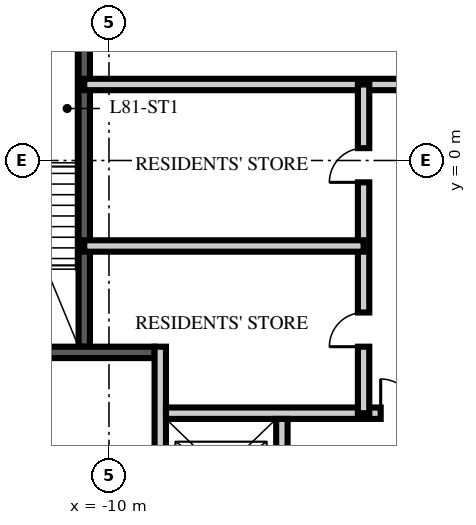
"""IFC4 building model, lengths in metres.
Left out: names, types, materials, properties, quantities, classifications, styles, units other than length and angle.
Written with IfcOpenShell. Run it as: python <this file> out.ifc"""

import sys

from ifc_helpers import new_model, si_unit, direction, frame, frame_2d, origin, place, context, subcontext, project, spatial, rectangle, extrude, element, fill, save


model = new_model("IFC4")
c1 = context("Model", 3, precision=1e-05, world=origin(), true_north=direction((0.0, 1.0)))
c2 = subcontext(c1, "Body", "Model", "MODEL_VIEW")
j1 = project(units=[si_unit("LENGTHUNIT", "METRE"), si_unit("PLANEANGLEUNIT", "RADIAN")], contexts=[c1])
p1 = place(None, origin())
s1 = spatial("IfcSite", under=j1, at=p1, CompositionType="ELEMENT")
p2 = place(p1, origin())
s2 = spatial("IfcBuilding", under=s1, at=p2, CompositionType="ELEMENT")
p3 = place(p2, frame((0.0, 0.0, 323.25)))
s3 = spatial("IfcBuildingStorey", under=s2, at=p3, CompositionType="ELEMENT", Elevation=323.25)
p4 = place(p3, frame((-10.65, -4.9, 0.0), z_axis=(0.0, 0.0, 1.0), x_axis=(0.0, 1.0, 0.0)))
e1 = element("IfcWall", 1, at=p4, inside=s3, PredefinedType="SOLIDWALL", context=c2, shape_type="SweptSolid", body=[
    extrude(rectangle(XDim=10.1, YDim=0.3, at=frame_2d((5.05, 0.0))), origin(), (0.0, 0.0, 1.0), 3.5),
])
p5 = place(p3, frame((-14.85, -5.05, 0.0), z_axis=(0.0, 0.0, 1.0), x_axis=(1.0, 0.0, 0.0)))
e2 = element("IfcWall", 2, at=p5, inside=s3, PredefinedType="SOLIDWALL", context=c2, shape_type="SweptSolid", body=[
    extrude(rectangle(XDim=6.05, YDim=0.3, at=frame_2d((3.025, 0.0))), origin(), (0.0, 0.0, 1.0), 3.5),
])
p6 = place(p5, frame((1.425, 0.0, 0.0)))
e3 = element("IfcOpeningElement", 3, at=p6, cuts=e2, PredefinedType="OPENING", context=c2, shape_type="SweptSolid", body=[
    extrude(rectangle(XDim=1.2, YDim=2.1, at=frame_2d((0.6, 1.05))), frame((0.0, 0.16, 0.0), z_axis=(0.0, -1.0, 0.0), x_axis=(1.0, 0.0, 0.0)), (0.0, 0.0, 1.0), 0.32),
])
p7 = place(p3, frame((-8.65, -11.35, 0.0), z_axis=(0.0, 0.0, 1.0), x_axis=(0.0, 1.0, 0.0)))
e4 = element("IfcWall", 4, at=p7, inside=s3, PredefinedType="PARTITIONING", context=c2, shape_type="SweptSolid", body=[
    extrude(rectangle(XDim=6.45, YDim=0.3, at=frame_2d((3.225, 0.0))), origin(), (0.0, 0.0, 1.0), 3.5),
])
p8 = place(p7, frame((2.6, 0.0, 0.0)))
e5 = element("IfcOpeningElement", 5, at=p8, cuts=e4, PredefinedType="OPENING", context=c2, shape_type="SweptSolid", body=[
    extrude(rectangle(XDim=1.1, YDim=2.1, at=frame_2d((0.55, 1.05))), frame((0.0, 0.16, 0.0), z_axis=(0.0, -1.0, 0.0), x_axis=(1.0, 0.0, 0.0)), (0.0, 0.0, 1.0), 0.32),
])
p9 = place(p3, frame((-8.5, -6.65, 0.0), z_axis=(0.0, 0.0, 1.0), x_axis=(1.0, 0.0, 0.0)))
e6 = element("IfcWall", 6, at=p9, inside=s3, PredefinedType="PARTITIONING", context=c2, shape_type="SweptSolid", body=[
    extrude(rectangle(XDim=17.0, YDim=0.3, at=frame_2d((8.5, 0.0))), origin(), (0.0, 0.0, 1.0), 3.5),
])
p10 = place(p9, frame((7.8, 0.0, 0.0)))
e7 = element("IfcOpeningElement", 7, at=p10, cuts=e6, PredefinedType="OPENING", context=c2, shape_type="SweptSolid", body=[
    extrude(rectangle(XDim=1.3, YDim=2.4, at=frame_2d((0.65, 1.2))), frame((0.0, 0.16, 0.0), z_axis=(0.0, -1.0, 0.0), x_axis=(1.0, 0.0, 0.0)), (0.0, 0.0, 1.0), 0.32),
])
p11 = place(p9, frame((5.65, 0.0, 0.0)))
e8 = element("IfcOpeningElement", 8, at=p11, cuts=e6, PredefinedType="OPENING", context=c2, shape_type="SweptSolid", body=[
    extrude(rectangle(XDim=0.9, YDim=2.1, at=frame_2d((0.45, 1.05))), frame((0.0, 0.16, 0.0), z_axis=(0.0, -1.0, 0.0), x_axis=(1.0, 0.0, 0.0)), (0.0, 0.0, 1.0), 0.32),
])
p12 = place(p9, frame((10.4, 0.0, 0.0)))
e9 = element("IfcOpeningElement", 9, at=p12, cuts=e6, PredefinedType="OPENING", context=c2, shape_type="SweptSolid", body=[
    extrude(rectangle(XDim=0.9, YDim=2.1, at=frame_2d((0.45, 1.05))), frame((0.0, 0.16, 0.0), z_axis=(0.0, -1.0, 0.0), x_axis=(1.0, 0.0, 0.0)), (0.0, 0.0, 1.0), 0.32),
])
p13 = place(p3, frame((-5.45, -11.35, 0.0), z_axis=(0.0, 0.0, 1.0), x_axis=(0.0, 1.0, 0.0)))
e10 = element("IfcWall", 10, at=p13, inside=s3, PredefinedType="PARTITIONING", context=c2, shape_type="SweptSolid", body=[
    extrude(rectangle(XDim=4.55, YDim=0.3, at=frame_2d((2.275, 0.0))), origin(), (0.0, 0.0, 1.0), 3.5),
])
p14 = place(p3, frame((-10.65, 2.0, 0.0), z_axis=(0.0, 0.0, 1.0), x_axis=(1.0, 0.0, 0.0)))
e11 = element("IfcWall", 11, at=p14, inside=s3, PredefinedType="PARTITIONING", context=c2, shape_type="SweptSolid", body=[
    extrude(rectangle(XDim=21.3, YDim=0.3, at=frame_2d((10.65, 0.0))), origin(), (0.0, 0.0, 1.0), 3.5),
])
p15 = place(p14, frame((10.05, 0.0, 0.0)))
e12 = element("IfcOpeningElement", 12, at=p15, cuts=e11, PredefinedType="OPENING", context=c2, shape_type="SweptSolid", body=[
    extrude(rectangle(XDim=1.2, YDim=2.1, at=frame_2d((0.6, 1.05))), frame((0.0, 0.16, 0.0), z_axis=(0.0, -1.0, 0.0), x_axis=(1.0, 0.0, 0.0)), (0.0, 0.0, 1.0), 0.32),
])
p16 = place(p14, frame((18.942, 0.0, 0.0)))
e13 = element("IfcOpeningElement", 13, at=p16, cuts=e11, PredefinedType="OPENING", context=c2, shape_type="SweptSolid", body=[
    extrude(rectangle(XDim=0.9, YDim=2.1, at=frame_2d((0.45, 1.05))), frame((0.0, 0.16, 0.0), z_axis=(0.0, -1.0, 0.0), x_axis=(1.0, 0.0, 0.0)), (0.0, 0.0, 1.0), 0.32),
])
p17 = place(p3, frame((-3.3, -6.65, 0.0), z_axis=(0.0, 0.0, 1.0), x_axis=(0.0, 1.0, 0.0)))
e14 = element("IfcWall", 14, at=p17, inside=s3, PredefinedType="PARTITIONING", context=c2, shape_type="SweptSolid", body=[
    extrude(rectangle(XDim=8.65, YDim=0.3, at=frame_2d((4.325, 0.0))), origin(), (0.0, 0.0, 1.0), 3.5),
])
p18 = place(p17, frame((1.75, 0.0, 0.0)))
e15 = element("IfcOpeningElement", 15, at=p18, cuts=e14, PredefinedType="OPENING", context=c2, shape_type="SweptSolid", body=[
    extrude(rectangle(XDim=0.9, YDim=2.1, at=frame_2d((0.45, 1.05))), frame((0.0, 0.16, 0.0), z_axis=(0.0, -1.0, 0.0), x_axis=(1.0, 0.0, 0.0)), (0.0, 0.0, 1.0), 0.32),
])
p19 = place(p17, frame((6.075, 0.0, 0.0)))
e16 = element("IfcOpeningElement", 16, at=p19, cuts=e14, PredefinedType="OPENING", context=c2, shape_type="SweptSolid", body=[
    extrude(rectangle(XDim=0.9, YDim=2.1, at=frame_2d((0.45, 1.05))), frame((0.0, 0.16, 0.0), z_axis=(0.0, -1.0, 0.0), x_axis=(1.0, 0.0, 0.0)), (0.0, 0.0, 1.0), 0.32),
])
p20 = place(p3, frame((-10.65, -2.25, 0.0), z_axis=(0.0, 0.0, 1.0), x_axis=(1.0, 0.0, 0.0)))
e17 = element("IfcWall", 17, at=p20, inside=s3, PredefinedType="PARTITIONING", context=c2, shape_type="SweptSolid", body=[
    extrude(rectangle(XDim=7.35, YDim=0.3, at=frame_2d((3.675, 0.0))), origin(), (0.0, 0.0, 1.0), 3.5),
])
p21 = place(p11, origin())
e18 = element("IfcDoor", 18, at=p21, inside=s3, OperationType="SINGLE_SWING_LEFT", PredefinedType="DOOR", context=c2, shape_type="SweptSolid", body=[
    extrude(rectangle(XDim=0.9, YDim=2.1, at=frame_2d((0.45, 1.05))), frame((0.0, 0.025, 0.0), z_axis=(0.0, -1.0, 0.0), x_axis=(1.0, 0.0, 0.0)), (0.0, 0.0, 1.0), 0.05),
])
fill(e8, e18)
p22 = place(p18, origin())
e19 = element("IfcDoor", 19, at=p22, inside=s3, OperationType="SINGLE_SWING_LEFT", PredefinedType="DOOR", context=c2, shape_type="SweptSolid", body=[
    extrude(rectangle(XDim=0.9, YDim=2.1, at=frame_2d((0.45, 1.05))), frame((0.0, 0.025, 0.0), z_axis=(0.0, -1.0, 0.0), x_axis=(1.0, 0.0, 0.0)), (0.0, 0.0, 1.0), 0.05),
])
fill(e15, e19)
p23 = place(p19, origin())
e20 = element("IfcDoor", 20, at=p23, inside=s3, OperationType="SINGLE_SWING_LEFT", PredefinedType="DOOR", context=c2, shape_type="SweptSolid", body=[
    extrude(rectangle(XDim=0.9, YDim=2.1, at=frame_2d((0.45, 1.05))), frame((0.0, 0.025, 0.0), z_axis=(0.0, -1.0, 0.0), x_axis=(1.0, 0.0, 0.0)), (0.0, 0.0, 1.0), 0.05),
])
fill(e16, e20)
save(model, sys.argv[1])
